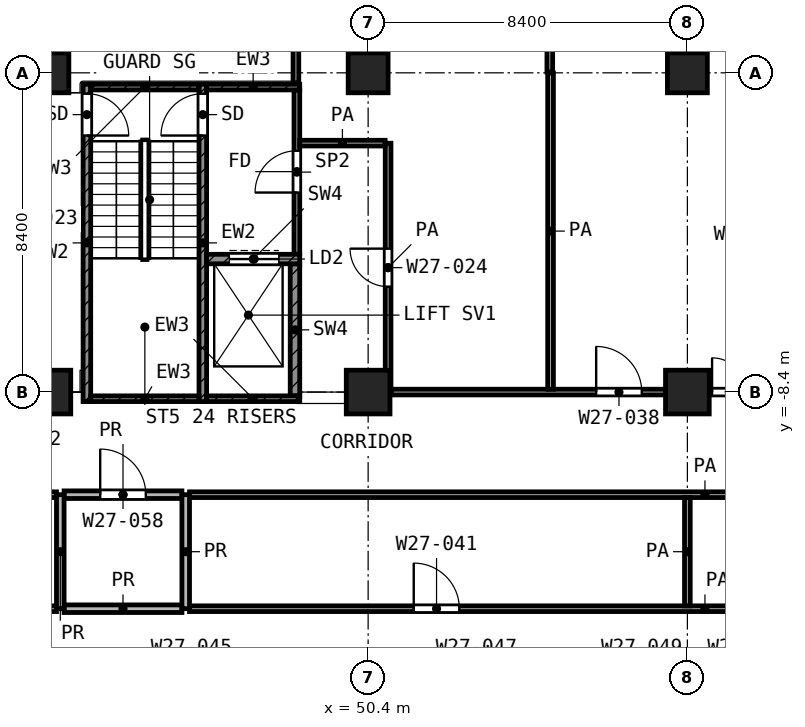
"""IFC4 building model, lengths in metres.
Left out: names, types, materials, properties, quantities, classifications, styles, units other than length and angle.
Written with IfcOpenShell. Run it as: python <this file> out.ifc"""

import sys

from ifc_helpers import new_model, si_unit, direction, frame, frame_2d, origin, origin_2d, place, context, subcontext, project, spatial, rectangle, extrude, element, fill, save


model = new_model("IFC4")
c1 = context("Model", 3, precision=1e-05, world=origin(), true_north=direction((0.0, 1.0)))
c2 = subcontext(c1, "Body", "Model", "MODEL_VIEW")
j1 = project(units=[si_unit("LENGTHUNIT", "METRE"), si_unit("PLANEANGLEUNIT", "RADIAN")], contexts=[c1])
p1 = place(None, origin())
s1 = spatial("IfcSite", under=j1, at=p1, CompositionType="ELEMENT")
p2 = place(p1, origin())
s2 = spatial("IfcBuilding", under=s1, at=p2, CompositionType="ELEMENT")
p3 = place(p2, frame((0.0, 0.0, 140.8)))
s3 = spatial("IfcBuildingStorey", under=s2, at=p3, CompositionType="ELEMENT", Elevation=140.8)
for number, where, z_axis, x_axis in (
    (1, (42.0, 0.0, 0.0), (0.0, 0.0, 1.0), (1.0, 0.0, 0.0)),
    (2, (50.4, 0.0, 0.0), (0.0, 0.0, 1.0), (1.0, 0.0, 0.0)),
    (3, (58.8, 0.0, 0.0), (0.0, 0.0, 1.0), (1.0, 0.0, 0.0)),
):
    element("IfcColumn", number, at=place(p3, frame(where, z_axis=z_axis, x_axis=x_axis)), inside=s3, PredefinedType="COLUMN", context=c2, shape_type="SweptSolid", body=[
        extrude(rectangle(XDim=1.05, YDim=1.05, at=origin_2d()), origin(), (0.0, 0.0, 1.0), 4.2),
    ])
for number, where, z_axis, x_axis in (
    (4, (42.0, -8.4, 0.0), (0.0, 0.0, 1.0), (1.0, 0.0, 0.0)),
    (5, (50.4, -8.4, 0.0), (0.0, 0.0, 1.0), (1.0, 0.0, 0.0)),
    (6, (58.8, -8.4, 0.0), (0.0, 0.0, 1.0), (1.0, 0.0, 0.0)),
):
    element("IfcColumn", number, at=place(p3, frame(where, z_axis=z_axis, x_axis=x_axis)), inside=s3, PredefinedType="COLUMN", context=c2, shape_type="SweptSolid", body=[
        extrude(rectangle(XDim=1.15, YDim=1.15, at=origin_2d()), origin(), (0.0, 0.0, 1.0), 4.2),
    ])
p4 = place(p3, frame((43.0, -8.65, 0.0), z_axis=(0.0, 0.0, 1.0), x_axis=(0.0, 1.0, 0.0)))
e7 = element("IfcWall", 7, at=p4, inside=s3, PredefinedType="SHEAR", context=c2, shape_type="SweptSolid", body=[
    extrude(rectangle(XDim=8.35, YDim=0.2, at=frame_2d((4.175, 0.0))), origin(), (0.0, 0.0, 1.0), 3.6),
])
p5 = place(p4, frame((7.0, 0.0, 0.0)))
e8 = element("IfcOpeningElement", 8, at=p5, cuts=e7, PredefinedType="OPENING", context=c2, shape_type="SweptSolid", body=[
    extrude(rectangle(XDim=1.1, YDim=2.1, at=frame_2d((0.55, 1.05))), frame((0.0, 0.11, 0.0), z_axis=(0.0, -1.0, 0.0), x_axis=(1.0, 0.0, 0.0)), (0.0, 0.0, 1.0), 0.22),
])
p6 = place(p3, frame((46.05, -8.65, 0.0), z_axis=(0.0, 0.0, 1.0), x_axis=(0.0, 1.0, 0.0)))
e9 = element("IfcWall", 9, at=p6, inside=s3, PredefinedType="SHEAR", context=c2, shape_type="SweptSolid", body=[
    extrude(rectangle(XDim=8.35, YDim=0.2, at=frame_2d((4.175, 0.0))), origin(), (0.0, 0.0, 1.0), 3.6),
])
p7 = place(p6, frame((7.0, 0.0, 0.0)))
e10 = element("IfcOpeningElement", 10, at=p7, cuts=e9, PredefinedType="OPENING", context=c2, shape_type="SweptSolid", body=[
    extrude(rectangle(XDim=1.1, YDim=2.1, at=frame_2d((0.55, 1.05))), frame((0.0, 0.11, 0.0), z_axis=(0.0, -1.0, 0.0), x_axis=(1.0, 0.0, 0.0)), (0.0, 0.0, 1.0), 0.22),
])
p8 = place(p3, frame((43.1, -0.375, 0.0), z_axis=(0.0, 0.0, 1.0), x_axis=(1.0, 0.0, 0.0)))
e11 = element("IfcWall", 11, at=p8, inside=s3, PredefinedType="SHEAR", context=c2, shape_type="SweptSolid", body=[
    extrude(rectangle(XDim=2.85, YDim=0.15, at=frame_2d((1.425, 0.0))), origin(), (0.0, 0.0, 1.0), 3.6),
])
p9 = place(p3, frame((46.15, -0.375, 0.0), z_axis=(0.0, 0.0, 1.0), x_axis=(1.0, 0.0, 0.0)))
e12 = element("IfcWall", 12, at=p9, inside=s3, PredefinedType="SHEAR", context=c2, shape_type="SweptSolid", body=[
    extrude(rectangle(XDim=2.45, YDim=0.15, at=frame_2d((1.225, 0.0))), origin(), (0.0, 0.0, 1.0), 3.6),
])
p10 = place(p3, frame((43.1, -8.575, 0.0), z_axis=(0.0, 0.0, 1.0), x_axis=(1.0, 0.0, 0.0)))
e13 = element("IfcWall", 13, at=p10, inside=s3, PredefinedType="SHEAR", context=c2, shape_type="SweptSolid", body=[
    extrude(rectangle(XDim=2.85, YDim=0.15, at=frame_2d((1.425, 0.0))), origin(), (0.0, 0.0, 1.0), 3.6),
])
p11 = place(p3, frame((46.15, -8.575, 0.0), z_axis=(0.0, 0.0, 1.0), x_axis=(1.0, 0.0, 0.0)))
e14 = element("IfcWall", 14, at=p11, inside=s3, PredefinedType="SHEAR", context=c2, shape_type="SweptSolid", body=[
    extrude(rectangle(XDim=2.45, YDim=0.15, at=frame_2d((1.225, 0.0))), origin(), (0.0, 0.0, 1.0), 3.6),
])
p12 = place(p3, frame((46.15, -4.9, 0.0), z_axis=(0.0, 0.0, 1.0), x_axis=(1.0, 0.0, 0.0)))
e15 = element("IfcWall", 15, at=p12, inside=s3, PredefinedType="SHEAR", context=c2, shape_type="SweptSolid", body=[
    extrude(rectangle(XDim=2.45, YDim=0.25, at=frame_2d((1.225, 0.0))), origin(), (0.0, 0.0, 1.0), 3.6),
])
p13 = place(p12, frame((0.6, 0.0, 0.0)))
e16 = element("IfcOpeningElement", 16, at=p13, cuts=e15, PredefinedType="OPENING", context=c2, shape_type="SweptSolid", body=[
    extrude(rectangle(XDim=1.3, YDim=2.1, at=frame_2d((0.65, 1.05))), frame((0.0, 0.135, 0.0), z_axis=(0.0, -1.0, 0.0), x_axis=(1.0, 0.0, 0.0)), (0.0, 0.0, 1.0), 0.27),
])
p14 = place(p3, frame((48.475, -8.5, 0.0), z_axis=(0.0, 0.0, 1.0), x_axis=(0.0, 1.0, 0.0)))
e17 = element("IfcWall", 17, at=p14, inside=s3, PredefinedType="SHEAR", context=c2, shape_type="SweptSolid", body=[
    extrude(rectangle(XDim=3.475, YDim=0.25, at=frame_2d((1.738, 0.0))), origin(), (0.0, 0.0, 1.0), 3.6),
])
p15 = place(p3, frame((48.525, -4.775, 0.0), z_axis=(0.0, 0.0, 1.0), x_axis=(0.0, 1.0, 0.0)))
e18 = element("IfcWall", 18, at=p15, inside=s3, PredefinedType="PARTITIONING", context=c2, shape_type="SweptSolid", body=[
    extrude(rectangle(XDim=4.325, YDim=0.15, at=frame_2d((2.163, 0.0))), origin(), (0.0, 0.0, 1.0), 3.6),
])
p16 = place(p15, frame((1.625, 0.0, 0.0)))
e19 = element("IfcOpeningElement", 19, at=p16, cuts=e18, PredefinedType="OPENING", context=c2, shape_type="SweptSolid", body=[
    extrude(rectangle(XDim=1.1, YDim=2.1, at=frame_2d((0.55, 1.05))), frame((0.0, 0.085, 0.0), z_axis=(0.0, -1.0, 0.0), x_axis=(1.0, 0.0, 0.0)), (0.0, 0.0, 1.0), 0.17),
])
p17 = place(p3, frame((29.475, -14.1, 0.0), z_axis=(0.0, 0.0, 1.0), x_axis=(1.0, 0.0, 0.0)))
e20 = element("IfcWall", 20, at=p17, inside=s3, PredefinedType="PARTITIONING", context=c2, shape_type="SweptSolid", body=[
    extrude(rectangle(XDim=12.725, YDim=0.15, at=frame_2d((6.362, 0.0))), origin(), (0.0, 0.0, 1.0), 3.6),
])
p18 = place(p3, frame((45.7, -14.1, 0.0), z_axis=(0.0, 0.0, 1.0), x_axis=(1.0, 0.0, 0.0)))
e21 = element("IfcWall", 21, at=p18, inside=s3, PredefinedType="PARTITIONING", context=c2, shape_type="SweptSolid", body=[
    extrude(rectangle(XDim=27.125, YDim=0.15, at=frame_2d((13.562, 0.0))), origin(), (0.0, 0.0, 1.0), 3.6),
])
p19 = place(p18, frame((5.9, 0.0, 0.0)))
e22 = element("IfcOpeningElement", 22, at=p19, cuts=e21, PredefinedType="OPENING", context=c2, shape_type="SweptSolid", body=[
    extrude(rectangle(XDim=1.2, YDim=2.1, at=frame_2d((0.6, 1.05))), frame((0.0, 0.085, 0.0), z_axis=(0.0, -1.0, 0.0), x_axis=(1.0, 0.0, 0.0)), (0.0, 0.0, 1.0), 0.17),
])
p20 = place(p18, frame((19.65, 0.0, 0.0)))
e23 = element("IfcOpeningElement", 23, at=p20, cuts=e21, PredefinedType="OPENING", context=c2, shape_type="SweptSolid", body=[
    extrude(rectangle(XDim=1.0, YDim=2.1, at=frame_2d((0.5, 1.05))), frame((0.0, 0.085, 0.0), z_axis=(0.0, -1.0, 0.0), x_axis=(1.0, 0.0, 0.0)), (0.0, 0.0, 1.0), 0.17),
])
p21 = place(p3, frame((29.475, -11.1, 0.0), z_axis=(0.0, 0.0, 1.0), x_axis=(1.0, 0.0, 0.0)))
e24 = element("IfcWall", 24, at=p21, inside=s3, PredefinedType="PARTITIONING", context=c2, shape_type="SweptSolid", body=[
    extrude(rectangle(XDim=12.725, YDim=0.15, at=frame_2d((6.362, 0.0))), origin(), (0.0, 0.0, 1.0), 3.6),
])
p22 = place(p21, frame((1.525, 0.0, 0.0)))
e25 = element("IfcOpeningElement", 25, at=p22, cuts=e24, PredefinedType="OPENING", context=c2, shape_type="SweptSolid", body=[
    extrude(rectangle(XDim=1.0, YDim=2.1, at=frame_2d((0.5, 1.05))), frame((0.0, 0.085, 0.0), z_axis=(0.0, -1.0, 0.0), x_axis=(1.0, 0.0, 0.0)), (0.0, 0.0, 1.0), 0.17),
])
p23 = place(p21, frame((9.225, 0.0, 0.0)))
e26 = element("IfcOpeningElement", 26, at=p23, cuts=e24, PredefinedType="OPENING", context=c2, shape_type="SweptSolid", body=[
    extrude(rectangle(XDim=0.9, YDim=2.1, at=frame_2d((0.45, 1.05))), frame((0.0, 0.085, 0.0), z_axis=(0.0, -1.0, 0.0), x_axis=(1.0, 0.0, 0.0)), (0.0, 0.0, 1.0), 0.17),
])
p24 = place(p21, frame((11.275, 0.0, 0.0)))
e27 = element("IfcOpeningElement", 27, at=p24, cuts=e24, PredefinedType="OPENING", context=c2, shape_type="SweptSolid", body=[
    extrude(rectangle(XDim=1.0, YDim=2.1, at=frame_2d((0.5, 1.05))), frame((0.0, 0.085, 0.0), z_axis=(0.0, -1.0, 0.0), x_axis=(1.0, 0.0, 0.0)), (0.0, 0.0, 1.0), 0.17),
])
p25 = place(p21, frame((5.875, 0.0, 0.0)))
e28 = element("IfcOpeningElement", 28, at=p25, cuts=e24, PredefinedType="OPENING", context=c2, shape_type="SweptSolid", body=[
    extrude(rectangle(XDim=1.0, YDim=2.1, at=frame_2d((0.5, 1.05))), frame((0.0, 0.085, 0.0), z_axis=(0.0, -1.0, 0.0), x_axis=(1.0, 0.0, 0.0)), (0.0, 0.0, 1.0), 0.17),
])
p26 = place(p3, frame((45.7, -11.1, 0.0), z_axis=(0.0, 0.0, 1.0), x_axis=(1.0, 0.0, 0.0)))
e29 = element("IfcWall", 29, at=p26, inside=s3, PredefinedType="PARTITIONING", context=c2, shape_type="SweptSolid", body=[
    extrude(rectangle(XDim=27.125, YDim=0.15, at=frame_2d((13.562, 0.0))), origin(), (0.0, 0.0, 1.0), 3.6),
])
p27 = place(p3, frame((51.0, -8.4, 0.0), z_axis=(0.0, 0.0, 1.0), x_axis=(1.0, 0.0, 0.0)))
e30 = element("IfcWall", 30, at=p27, inside=s3, PredefinedType="PARTITIONING", context=c2, shape_type="SweptSolid", body=[
    extrude(rectangle(XDim=24.52, YDim=0.15, at=frame_2d((12.26, 0.0))), origin(), (0.0, 0.0, 1.0), 3.6),
])
p28 = place(p27, frame((5.4, 0.0, 0.0)))
e31 = element("IfcOpeningElement", 31, at=p28, cuts=e30, PredefinedType="OPENING", context=c2, shape_type="SweptSolid", body=[
    extrude(rectangle(XDim=1.2, YDim=2.1, at=frame_2d((0.6, 1.05))), frame((0.0, 0.085, 0.0), z_axis=(0.0, -1.0, 0.0), x_axis=(1.0, 0.0, 0.0)), (0.0, 0.0, 1.0), 0.17),
])
p29 = place(p27, frame((8.45, 0.0, 0.0)))
e32 = element("IfcOpeningElement", 32, at=p29, cuts=e30, PredefinedType="OPENING", context=c2, shape_type="SweptSolid", body=[
    extrude(rectangle(XDim=0.9, YDim=2.1, at=frame_2d((0.45, 1.05))), frame((0.0, 0.085, 0.0), z_axis=(0.0, -1.0, 0.0), x_axis=(1.0, 0.0, 0.0)), (0.0, 0.0, 1.0), 0.17),
])
p30 = place(p27, frame((14.0, 0.0, 0.0)))
e33 = element("IfcOpeningElement", 33, at=p30, cuts=e30, PredefinedType="OPENING", context=c2, shape_type="SweptSolid", body=[
    extrude(rectangle(XDim=1.2, YDim=2.1, at=frame_2d((0.6, 1.05))), frame((0.0, 0.085, 0.0), z_axis=(0.0, -1.0, 0.0), x_axis=(1.0, 0.0, 0.0)), (0.0, 0.0, 1.0), 0.17),
])
p31 = place(p27, frame((16.8, 0.0, 0.0)))
e34 = element("IfcOpeningElement", 34, at=p31, cuts=e30, PredefinedType="OPENING", context=c2, shape_type="SweptSolid", body=[
    extrude(rectangle(XDim=1.2, YDim=2.1, at=frame_2d((0.6, 1.05))), frame((0.0, 0.085, 0.0), z_axis=(0.0, -1.0, 0.0), x_axis=(1.0, 0.0, 0.0)), (0.0, 0.0, 1.0), 0.17),
])
p32 = place(p27, frame((22.15, 0.0, 0.0)))
e35 = element("IfcOpeningElement", 35, at=p32, cuts=e30, PredefinedType="OPENING", context=c2, shape_type="SweptSolid", body=[
    extrude(rectangle(XDim=1.0, YDim=2.1, at=frame_2d((0.5, 1.05))), frame((0.0, 0.085, 0.0), z_axis=(0.0, -1.0, 0.0), x_axis=(1.0, 0.0, 0.0)), (0.0, 0.0, 1.0), 0.17),
])
p33 = place(p3, frame((48.6, -1.85, 0.0), z_axis=(0.0, 0.0, 1.0), x_axis=(1.0, 0.0, 0.0)))
e36 = element("IfcWall", 36, at=p33, inside=s3, PredefinedType="PARTITIONING", context=c2, shape_type="SweptSolid", body=[
    extrude(rectangle(XDim=2.247, YDim=0.15, at=frame_2d((1.124, 0.0))), origin(), (0.0, 0.0, 1.0), 3.6),
])
p34 = place(p3, frame((48.5, -0.27, 0.0), z_axis=(0.0, 0.0, 1.0), x_axis=(0.0, 1.0, 0.0)))
e37 = element("IfcWall", 37, at=p34, inside=s3, PredefinedType="PARTITIONING", context=c2, shape_type="SweptSolid", body=[
    extrude(rectangle(XDim=6.19, YDim=0.15, at=frame_2d((3.095, 0.0))), origin(), (0.0, 0.0, 1.0), 3.6),
])
p35 = place(p3, frame((50.925, -8.4, 0.0), z_axis=(0.0, 0.0, 1.0), x_axis=(0.0, 1.0, 0.0)))
e38 = element("IfcWall", 38, at=p35, inside=s3, PredefinedType="PARTITIONING", context=c2, shape_type="SweptSolid", body=[
    extrude(rectangle(XDim=6.548, YDim=0.15, at=frame_2d((3.274, 0.0))), origin(), (0.0, 0.0, 1.0), 3.6),
])
p36 = place(p35, frame((2.774, 0.0, 0.0)))
e39 = element("IfcOpeningElement", 39, at=p36, cuts=e38, PredefinedType="OPENING", context=c2, shape_type="SweptSolid", body=[
    extrude(rectangle(XDim=1.0, YDim=2.1, at=frame_2d((0.5, 1.05))), frame((0.0, 0.085, 0.0), z_axis=(0.0, -1.0, 0.0), x_axis=(1.0, 0.0, 0.0)), (0.0, 0.0, 1.0), 0.17),
])
p37 = place(p3, frame((55.18, 0.02, 0.0), z_axis=(0.0, 0.0, 1.0), x_axis=(0.0, 1.0, 0.0)))
e40 = element("IfcWall", 40, at=p37, inside=s3, PredefinedType="PARTITIONING", context=c2, shape_type="SweptSolid", body=[
    extrude(rectangle(XDim=5.9, YDim=0.15, at=frame_2d((2.95, 0.0))), origin(), (0.0, 0.0, 1.0), 3.6),
])
p38 = place(p3, frame((55.2, -8.325, 0.0), z_axis=(0.0, 0.0, 1.0), x_axis=(0.0, 1.0, 0.0)))
e41 = element("IfcWall", 41, at=p38, inside=s3, PredefinedType="PARTITIONING", context=c2, shape_type="SweptSolid", body=[
    extrude(rectangle(XDim=8.321, YDim=0.15, at=frame_2d((4.161, 0.0))), origin(), (0.0, 0.0, 1.0), 3.6),
])
p39 = place(p3, frame((58.8, -14.025, 0.0), z_axis=(0.0, 0.0, 1.0), x_axis=(0.0, 1.0, 0.0)))
e42 = element("IfcWall", 42, at=p39, inside=s3, PredefinedType="PARTITIONING", context=c2, shape_type="SweptSolid", body=[
    extrude(rectangle(XDim=2.85, YDim=0.15, at=frame_2d((1.425, 0.0))), origin(), (0.0, 0.0, 1.0), 3.6),
])
p40 = place(p3, frame((42.4, -14.1, 0.0), z_axis=(0.0, 0.0, 1.0), x_axis=(1.0, 0.0, 0.0)))
e43 = element("IfcWall", 43, at=p40, inside=s3, PredefinedType="PARTITIONING", context=c2, shape_type="SweptSolid", body=[
    extrude(rectangle(XDim=3.1, YDim=0.2, at=frame_2d((1.55, 0.0))), origin(), (0.0, 0.0, 1.0), 3.6),
])
p41 = place(p3, frame((42.4, -11.1, 0.0), z_axis=(0.0, 0.0, 1.0), x_axis=(1.0, 0.0, 0.0)))
e44 = element("IfcWall", 44, at=p41, inside=s3, PredefinedType="PARTITIONING", context=c2, shape_type="SweptSolid", body=[
    extrude(rectangle(XDim=3.1, YDim=0.2, at=frame_2d((1.55, 0.0))), origin(), (0.0, 0.0, 1.0), 3.6),
])
p42 = place(p41, frame((0.95, 0.0, 0.0)))
e45 = element("IfcOpeningElement", 45, at=p42, cuts=e44, PredefinedType="OPENING", context=c2, shape_type="SweptSolid", body=[
    extrude(rectangle(XDim=1.2, YDim=2.1, at=frame_2d((0.6, 1.05))), frame((0.0, 0.11, 0.0), z_axis=(0.0, -1.0, 0.0), x_axis=(1.0, 0.0, 0.0)), (0.0, 0.0, 1.0), 0.22),
])
for number, where, z_axis, x_axis in (
    (46, (42.3, -14.1, 0.0), (0.0, 0.0, 1.0), (0.0, 1.0, 0.0)),
    (47, (45.6, -14.1, 0.0), (0.0, 0.0, 1.0), (0.0, 1.0, 0.0)),
):
    element("IfcWall", number, at=place(p3, frame(where, z_axis=z_axis, x_axis=x_axis)), inside=s3, PredefinedType="PARTITIONING", context=c2, shape_type="SweptSolid", body=[
        extrude(rectangle(XDim=3.0, YDim=0.2, at=frame_2d((1.5, 0.0))), origin(), (0.0, 0.0, 1.0), 3.6),
    ])
p43 = place(p5, frame((1.1, 0.0, 0.0), z_axis=(0.0, 0.0, 1.0), x_axis=(-1.0, 0.0, 0.0)))
e48 = element("IfcDoor", 48, at=p43, inside=s3, OperationType="SINGLE_SWING_LEFT", PredefinedType="DOOR", context=c2, shape_type="SweptSolid", body=[
    extrude(rectangle(XDim=1.1, YDim=2.1, at=frame_2d((0.55, 1.05))), frame((0.0, 0.025, 0.0), z_axis=(0.0, -1.0, 0.0), x_axis=(1.0, 0.0, 0.0)), (0.0, 0.0, 1.0), 0.05),
])
fill(e8, e48)
p44 = place(p7, origin())
e49 = element("IfcDoor", 49, at=p44, inside=s3, OperationType="SINGLE_SWING_LEFT", PredefinedType="DOOR", context=c2, shape_type="SweptSolid", body=[
    extrude(rectangle(XDim=1.1, YDim=2.1, at=frame_2d((0.55, 1.05))), frame((0.0, 0.025, 0.0), z_axis=(0.0, -1.0, 0.0), x_axis=(1.0, 0.0, 0.0)), (0.0, 0.0, 1.0), 0.05),
])
fill(e10, e49)
p45 = place(p13, origin())
e50 = element("IfcDoor", 50, at=p45, inside=s3, OperationType="DOUBLE_DOOR_SLIDING", PredefinedType="DOOR", context=c2, shape_type="SweptSolid", body=[
    extrude(rectangle(XDim=1.3, YDim=2.1, at=frame_2d((0.65, 1.05))), frame((0.0, 0.025, 0.0), z_axis=(0.0, -1.0, 0.0), x_axis=(1.0, 0.0, 0.0)), (0.0, 0.0, 1.0), 0.05),
])
fill(e16, e50)
p46 = place(p16, origin())
e51 = element("IfcDoor", 51, at=p46, inside=s3, OperationType="SINGLE_SWING_LEFT", PredefinedType="DOOR", context=c2, shape_type="SweptSolid", body=[
    extrude(rectangle(XDim=1.1, YDim=2.1, at=frame_2d((0.55, 1.05))), frame((0.0, 0.025, 0.0), z_axis=(0.0, -1.0, 0.0), x_axis=(1.0, 0.0, 0.0)), (0.0, 0.0, 1.0), 0.05),
])
fill(e19, e51)
p47 = place(p36, origin())
e52 = element("IfcDoor", 52, at=p47, inside=s3, OperationType="SINGLE_SWING_RIGHT", PredefinedType="DOOR", context=c2, shape_type="SweptSolid", body=[
    extrude(rectangle(XDim=1.0, YDim=2.1, at=frame_2d((0.5, 1.05))), frame((0.0, 0.025, 0.0), z_axis=(0.0, -1.0, 0.0), x_axis=(1.0, 0.0, 0.0)), (0.0, 0.0, 1.0), 0.05),
])
fill(e39, e52)
p48 = place(p28, origin())
e53 = element("IfcDoor", 53, at=p48, inside=s3, OperationType="SINGLE_SWING_LEFT", PredefinedType="DOOR", context=c2, shape_type="SweptSolid", body=[
    extrude(rectangle(XDim=1.2, YDim=2.1, at=frame_2d((0.6, 1.05))), frame((0.0, 0.025, 0.0), z_axis=(0.0, -1.0, 0.0), x_axis=(1.0, 0.0, 0.0)), (0.0, 0.0, 1.0), 0.05),
])
fill(e31, e53)
p49 = place(p29, origin())
e54 = element("IfcDoor", 54, at=p49, inside=s3, OperationType="SINGLE_SWING_LEFT", PredefinedType="DOOR", context=c2, shape_type="SweptSolid", body=[
    extrude(rectangle(XDim=0.9, YDim=2.1, at=frame_2d((0.45, 1.05))), frame((0.0, 0.025, 0.0), z_axis=(0.0, -1.0, 0.0), x_axis=(1.0, 0.0, 0.0)), (0.0, 0.0, 1.0), 0.05),
])
fill(e32, e54)
p50 = place(p19, origin())
e55 = element("IfcDoor", 55, at=p50, inside=s3, OperationType="SINGLE_SWING_LEFT", PredefinedType="DOOR", context=c2, shape_type="SweptSolid", body=[
    extrude(rectangle(XDim=1.2, YDim=2.1, at=frame_2d((0.6, 1.05))), frame((0.0, 0.025, 0.0), z_axis=(0.0, -1.0, 0.0), x_axis=(1.0, 0.0, 0.0)), (0.0, 0.0, 1.0), 0.05),
])
fill(e22, e55)
p51 = place(p42, origin())
e56 = element("IfcDoor", 56, at=p51, inside=s3, OperationType="SINGLE_SWING_LEFT", PredefinedType="DOOR", context=c2, shape_type="SweptSolid", body=[
    extrude(rectangle(XDim=1.2, YDim=2.1, at=frame_2d((0.6, 1.05))), frame((0.0, 0.025, 0.0), z_axis=(0.0, -1.0, 0.0), x_axis=(1.0, 0.0, 0.0)), (0.0, 0.0, 1.0), 0.05),
])
fill(e45, e56)
save(model, sys.argv[1])
